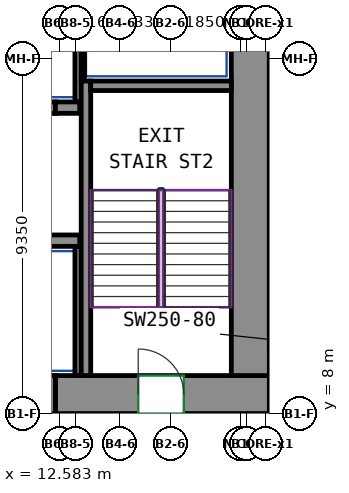
"""IFC4 building model, lengths in metres.
Left out: names, types, materials, properties, quantities, classifications, styles, units other than length and angle.
Written with IfcOpenShell. Run it as: python <this file> out.ifc"""

import sys

from ifc_helpers import new_model, si_unit, direction, frame, frame_2d, origin, place, context, subcontext, project, spatial, rectangle, extrude, source, transform, mapped, element, fill, save


model = new_model("IFC4")
c1 = context("Model", 3, precision=1e-05, world=origin(), true_north=direction((0.0, 1.0)))
c2 = subcontext(c1, "Body", "Model", "MODEL_VIEW")
j1 = project(units=[si_unit("LENGTHUNIT", "METRE"), si_unit("PLANEANGLEUNIT", "RADIAN")], contexts=[c1])
p1 = place(None, origin())
s1 = spatial("IfcSite", under=j1, at=p1, CompositionType="ELEMENT")
p2 = place(p1, origin())
s2 = spatial("IfcBuilding", under=s1, at=p2, CompositionType="ELEMENT")
p3 = place(p2, frame((0.0, 0.0, 51.0)))
s3 = spatial("IfcBuildingStorey", under=s2, at=p3, CompositionType="ELEMENT", Elevation=51.0)
m1 = source(origin(), c2, "Body", "SweptSolid", [
    extrude(rectangle(XDim=5.63, YDim=1.0, at=frame_2d((2.815, 0.0))), origin(), (0.0, 0.0, 1.0), 3.72),
])
p4 = place(p3, frame((12.47, 8.5, 0.0), z_axis=(0.0, 0.0, 1.0), x_axis=(1.0, 0.0, 0.0)))
e1 = element("IfcWall", 1, at=p4, inside=s3, PredefinedType="SHEAR", context=c2, shape_type="MappedRepresentation", body=[
    mapped(m1, transform((0.0, 0.0, 0.0))),
])
p5 = place(p4, frame((2.18, 0.0, 0.0)))
e2 = element("IfcOpeningElement", 2, at=p5, cuts=e1, PredefinedType="OPENING", context=c2, shape_type="SweptSolid", body=[
    extrude(rectangle(XDim=1.2, YDim=2.1, at=frame_2d((0.6, 1.05))), frame((0.0, 0.51, 0.0), z_axis=(0.0, -1.0, 0.0), x_axis=(1.0, 0.0, 0.0)), (0.0, 0.0, 1.0), 1.02),
])
m2 = source(origin(), c2, "Body", "SweptSolid", [
    extrude(rectangle(XDim=12.0, YDim=1.0, at=frame_2d((6.0, 0.0))), origin(), (0.0, 0.0, 1.0), 3.72),
])
p6 = place(p3, frame((17.6, 9.0, 0.0), z_axis=(0.0, 0.0, 1.0), x_axis=(0.0, 1.0, 0.0)))
e3 = element("IfcWall", 3, at=p6, inside=s3, PredefinedType="SHEAR", context=c2, shape_type="MappedRepresentation", body=[
    mapped(m2, transform((0.0, 0.0, 0.0))),
])
m3 = source(origin(), c2, "Body", "SweptSolid", [
    extrude(rectangle(XDim=7.75, YDim=0.25, at=frame_2d((3.875, 0.0))), origin(), (0.0, 0.0, 1.0), 3.72),
])
p7 = place(p3, frame((13.275, 9.0, 0.0), z_axis=(0.0, 0.0, 1.0), x_axis=(0.0, 1.0, 0.0)))
e4 = element("IfcWall", 4, at=p7, inside=s3, PredefinedType="SHEAR", context=c2, shape_type="MappedRepresentation", body=[
    mapped(m3, transform((0.0, 0.0, 0.0))),
])
m4 = source(origin(), c2, "Body", "SweptSolid", [
    extrude(rectangle(XDim=3.7, YDim=0.25, at=frame_2d((1.85, 0.0))), origin(), (0.0, 0.0, 1.0), 3.72),
])
p8 = place(p3, frame((13.4, 16.625, 0.0), z_axis=(0.0, 0.0, 1.0), x_axis=(1.0, 0.0, 0.0)))
e5 = element("IfcWall", 5, at=p8, inside=s3, PredefinedType="SHEAR", context=c2, shape_type="MappedRepresentation", body=[
    mapped(m4, transform((0.0, 0.0, 0.0))),
])
m5 = source(origin(), c2, "Body", "SweptSolid", [
    extrude(rectangle(XDim=2.82, YDim=0.3, at=frame_2d((1.41, 0.0))), origin(), (0.0, 0.0, 1.0), 3.72),
])
p9 = place(p3, frame((10.29, 12.55, 0.0), z_axis=(0.0, 0.0, 1.0), x_axis=(1.0, 0.0, 0.0)))
e6 = element("IfcWall", 6, at=p9, inside=s3, PredefinedType="SHEAR", context=c2, shape_type="MappedRepresentation", body=[
    mapped(m5, transform((0.0, 0.0, 0.0))),
])
m6 = source(origin(), c2, "Body", "SweptSolid", [
    extrude(rectangle(XDim=0.64, YDim=0.3, at=frame_2d((0.32, 0.0))), origin(), (0.0, 0.0, 1.0), 3.72),
])
p10 = place(p3, frame((12.47, 16.05, 0.0), z_axis=(0.0, 0.0, 1.0), x_axis=(1.0, 0.0, 0.0)))
e7 = element("IfcWall", 7, at=p10, inside=s3, PredefinedType="SHEAR", context=c2, shape_type="MappedRepresentation", body=[
    mapped(m6, transform((0.0, 0.0, 0.0))),
])
m7 = source(origin(), c2, "Body", "SweptSolid", [
    extrude(rectangle(XDim=1.4, YDim=0.3, at=frame_2d((0.7, 0.0))), origin(), (0.0, 0.0, 1.0), 3.72),
])
p11 = place(p3, frame((11.07, 16.05, 0.0), z_axis=(0.0, 0.0, 1.0), x_axis=(1.0, 0.0, 0.0)))
e8 = element("IfcWall", 8, at=p11, inside=s3, PredefinedType="PARTITIONING", context=c2, shape_type="MappedRepresentation", body=[
    mapped(m7, transform((0.0, 0.0, 0.0))),
])
p12 = place(p11, frame((0.15, 0.0, 0.0)))
e9 = element("IfcOpeningElement", 9, at=p12, cuts=e8, PredefinedType="OPENING", context=c2, shape_type="SweptSolid", body=[
    extrude(rectangle(XDim=1.1, YDim=2.1, at=frame_2d((0.55, 1.05))), frame((0.0, 0.16, 0.0), z_axis=(0.0, -1.0, 0.0), x_axis=(1.0, 0.0, 0.0)), (0.0, 0.0, 1.0), 0.32),
])
m8 = source(origin(), c2, "Body", "SweptSolid", [
    extrude(rectangle(XDim=3.275, YDim=0.165, at=frame_2d((1.638, 0.0))), origin(), (0.0, 0.0, 1.0), 3.72),
])
p13 = place(p3, frame((13.067, 16.2, 0.0), z_axis=(0.0, 0.0, 1.0), x_axis=(0.0, 1.0, 0.0)))
e10 = element("IfcWall", 10, at=p13, inside=s3, PredefinedType="PARTITIONING", context=c2, shape_type="MappedRepresentation", body=[
    mapped(m8, transform((0.0, 0.0, 0.0))),
])
m9 = source(origin(), c2, "Body", "SweptSolid", [
    extrude(rectangle(XDim=2.725, YDim=0.085, at=frame_2d((1.363, 0.0))), origin(), (0.0, 0.0, 1.0), 3.72),
])
p14 = place(p3, frame((13.192, 16.75, 0.0), z_axis=(0.0, 0.0, 1.0), x_axis=(0.0, 1.0, 0.0)))
e11 = element("IfcWall", 11, at=p14, inside=s3, PredefinedType="PARTITIONING", context=c2, shape_type="MappedRepresentation", body=[
    mapped(m9, transform((0.0, 0.0, 0.0))),
])
m10 = source(origin(), c2, "Body", "SweptSolid", [
    extrude(rectangle(XDim=3.4, YDim=0.165, at=frame_2d((1.7, 0.0))), origin(), (0.0, 0.0, 1.0), 3.72),
])
p15 = place(p3, frame((13.067, 9.0, 0.0), z_axis=(0.0, 0.0, 1.0), x_axis=(0.0, 1.0, 0.0)))
e12 = element("IfcWall", 12, at=p15, inside=s3, PredefinedType="PARTITIONING", context=c2, shape_type="MappedRepresentation", body=[
    mapped(m10, transform((0.0, 0.0, 0.0))),
])
m11 = source(origin(), c2, "Body", "SweptSolid", [
    extrude(rectangle(XDim=1.4, YDim=1.0, at=frame_2d((0.7, 0.0))), origin(), (0.0, 0.0, 1.0), 2.7),
])
p16 = place(p3, frame((11.07, 8.5, 0.0), z_axis=(0.0, 0.0, 1.0), x_axis=(1.0, 0.0, 0.0)))
e13 = element("IfcWall", 13, at=p16, inside=s3, PredefinedType="PARTITIONING", context=c2, shape_type="MappedRepresentation", body=[
    mapped(m11, transform((0.0, 0.0, 0.0))),
])
p17 = place(p16, frame((0.25, 0.0, 0.0)))
e14 = element("IfcOpeningElement", 14, at=p17, cuts=e13, PredefinedType="OPENING", context=c2, shape_type="SweptSolid", body=[
    extrude(rectangle(XDim=0.9, YDim=2.1, at=frame_2d((0.45, 1.05))), frame((0.0, 0.51, 0.0), z_axis=(0.0, -1.0, 0.0), x_axis=(1.0, 0.0, 0.0)), (0.0, 0.0, 1.0), 1.02),
])
p18 = place(p5, origin())
e15 = element("IfcDoor", 15, at=p18, inside=s3, OperationType="DOUBLE_DOOR_SINGLE_SWING", PredefinedType="DOOR", context=c2, shape_type="SweptSolid", body=[
    extrude(rectangle(XDim=1.2, YDim=2.1, at=frame_2d((0.6, 1.05))), frame((0.0, 0.405, 0.0), z_axis=(0.0, -1.0, 0.0), x_axis=(1.0, 0.0, 0.0)), (0.0, 0.0, 1.0), 0.05),
])
fill(e2, e15)
save(model, sys.argv[1])
